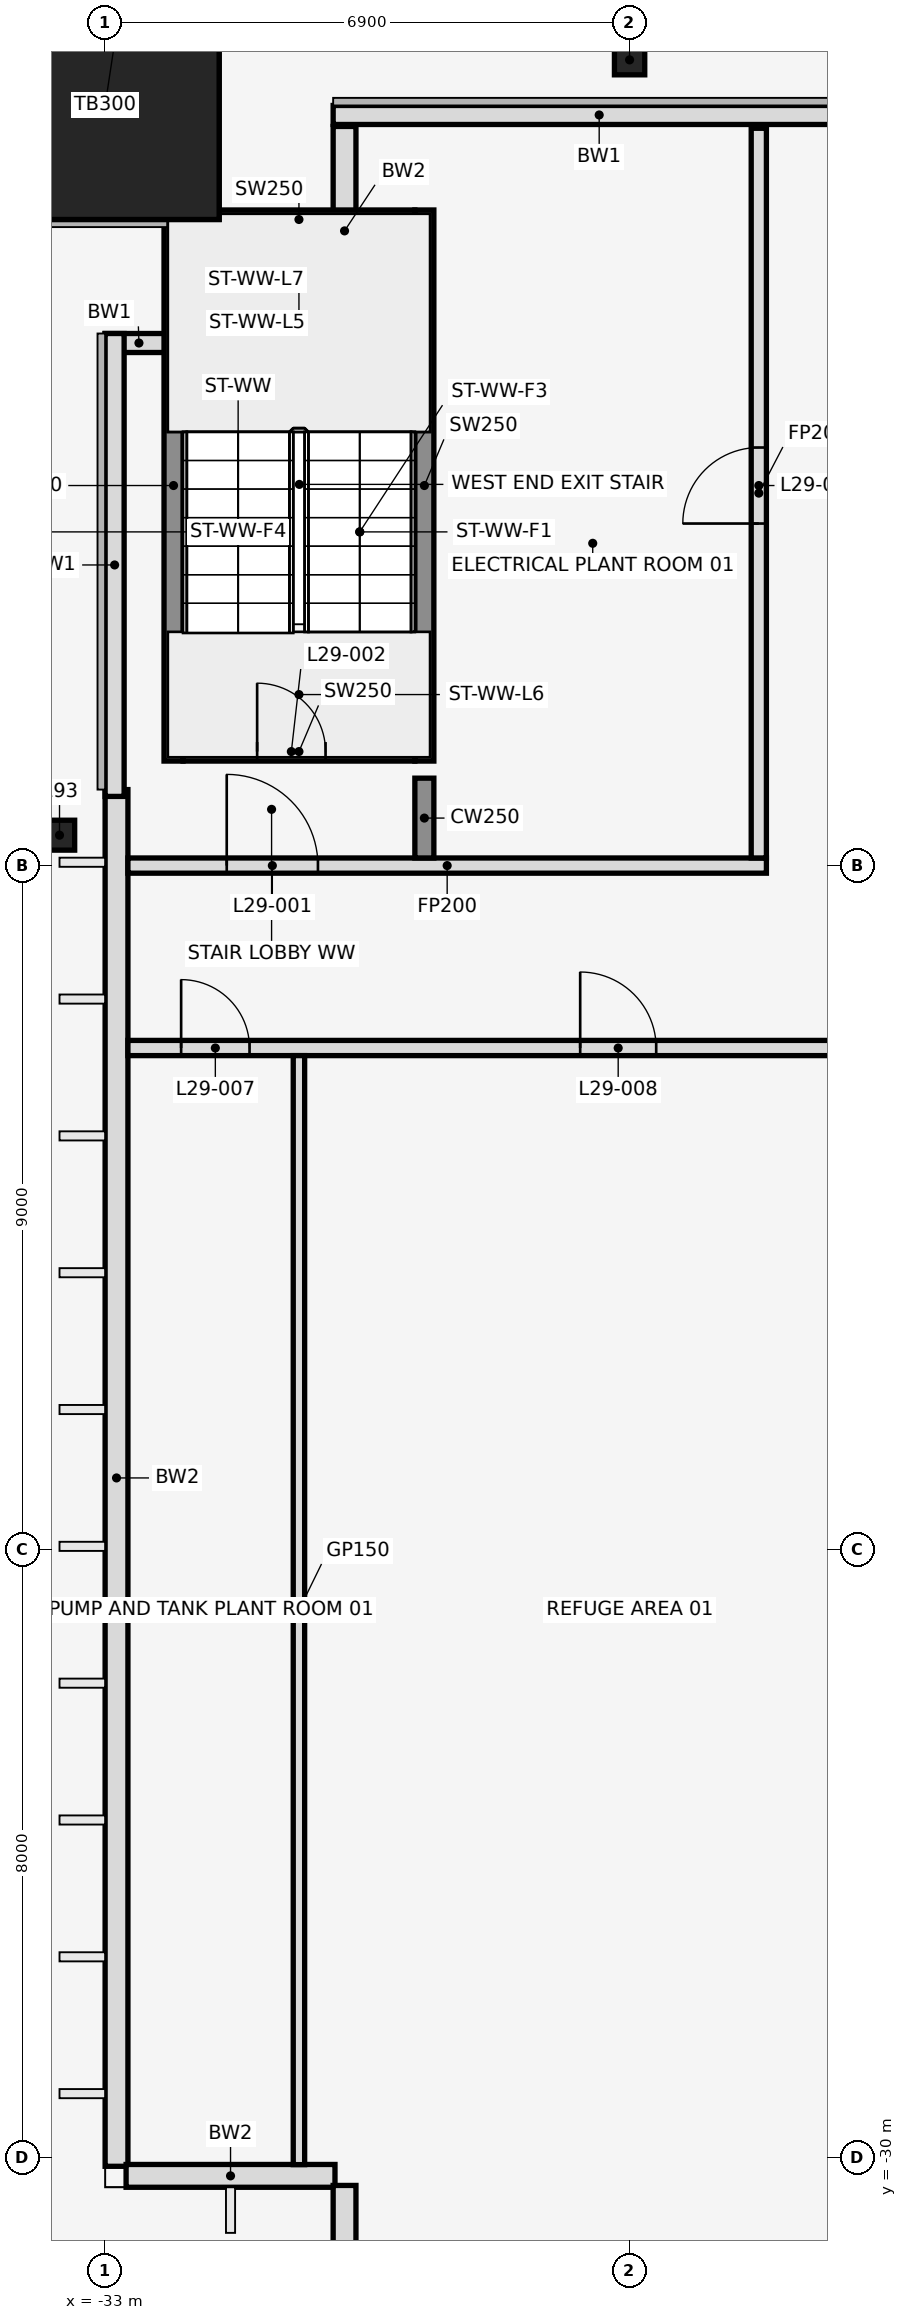
"""IFC4 building model, lengths in metres.
Left out: names, types, materials, properties, quantities, classifications, styles, units other than length and angle.
Written with IfcOpenShell. Run it as: python <this file> out.ifc"""

import sys

from ifc_helpers import new_model, si_unit, direction, frame, frame_2d, origin, origin_2d, place, context, subcontext, project, spatial, rectangle, hollow_rectangle, i_section, extrude, element, fill, save


model = new_model("IFC4")
c1 = context("Model", 3, precision=1e-05, world=origin(), true_north=direction((0.0, 1.0)))
c2 = subcontext(c1, "Body", "Model", "MODEL_VIEW")
j1 = project(units=[si_unit("LENGTHUNIT", "METRE"), si_unit("PLANEANGLEUNIT", "RADIAN")], contexts=[c1])
p1 = place(None, origin())
s1 = spatial("IfcSite", under=j1, at=p1, CompositionType="ELEMENT")
p2 = place(p1, origin())
s2 = spatial("IfcBuilding", under=s1, at=p2, CompositionType="ELEMENT")
p3 = place(p2, frame((0.0, 0.0, 135.0)))
s3 = spatial("IfcBuildingStorey", under=s2, at=p3, CompositionType="ELEMENT", Elevation=135.0)
p4 = place(p3, frame((-33.0, -3.0, 0.0), z_axis=(0.0, 0.0, 1.0), x_axis=(1.0, 0.0, 0.0)))
e1 = element("IfcColumn", 1, at=p4, inside=s3, PredefinedType="COLUMN", context=c2, shape_type="SweptSolid", body=[
    extrude(hollow_rectangle(XDim=3.0, YDim=3.0, WallThickness=0.09, at=origin_2d()), origin(), (0.0, 0.0, 1.0), 4.98),
])
for number, where, z_axis, x_axis in (
    (2, (-26.1, -2.4, 0.0), (0.0, 0.0, 1.0), (1.0, 0.0, 0.0)),
    (3, (-33.6, -12.6, 0.0), (0.0, 0.0, 1.0), (1.0, 0.0, 0.0)),
):
    element("IfcColumn", number, at=place(p3, frame(where, z_axis=z_axis, x_axis=x_axis)), inside=s3, PredefinedType="COLUMN", context=c2, shape_type="SweptSolid", body=[
        extrude(i_section(OverallWidth=0.399, OverallDepth=0.394, WebThickness=0.023, FlangeThickness=0.037, at=origin_2d()), origin(), (0.0, 0.0, 1.0), 5.4),
    ])
p5 = place(p3, frame((-33.0, -3.0, 4.98), z_axis=(0.0, 0.0, 1.0), x_axis=(1.0, 0.0, 0.0)))
e4 = element("IfcColumn", 4, at=p5, inside=s3, PredefinedType="COLUMN", context=c2, shape_type="SweptSolid", body=[
    extrude(rectangle(XDim=3.0, YDim=3.0, at=origin_2d()), origin(), (0.0, 0.0, 1.0), 0.42),
])
p6 = place(p3, frame((-29.85, -3.276, 0.0), z_axis=(0.0, 0.0, 1.0), x_axis=(0.0, -1.0, 0.0)))
e5 = element("IfcWall", 5, at=p6, inside=s3, PredefinedType="STANDARD", context=c2, shape_type="SweptSolid", body=[
    extrude(rectangle(XDim=2.748, YDim=0.3, at=frame_2d((1.374, 0.0))), origin(), (0.0, 0.0, 1.0), 5.25),
])
p7 = place(p3, frame((-32.85, -12.0, 0.0), z_axis=(0.0, 0.0, 1.0), x_axis=(0.0, -1.0, 0.0)))
e6 = element("IfcWall", 6, at=p7, inside=s3, PredefinedType="STANDARD", context=c2, shape_type="SweptSolid", body=[
    extrude(rectangle(XDim=18.112, YDim=0.3, at=frame_2d((9.056, 0.0))), origin(), (0.0, 0.0, 1.0), 4.338),
])
p8 = place(p3, frame((-32.724, -30.238, 0.0), z_axis=(0.0, 0.0, 1.0), x_axis=(1.0, 0.0, 0.0)))
e7 = element("IfcWall", 7, at=p8, inside=s3, PredefinedType="STANDARD", context=c2, shape_type="SweptSolid", body=[
    extrude(rectangle(XDim=2.748, YDim=0.3, at=frame_2d((1.374, 0.0))), origin(), (0.0, 0.0, 1.0), 4.28),
])
p9 = place(p3, frame((-29.85, -30.364, 0.0), z_axis=(0.0, 0.0, 1.0), x_axis=(0.0, -1.0, 0.0)))
e8 = element("IfcWall", 8, at=p9, inside=s3, PredefinedType="STANDARD", context=c2, shape_type="SweptSolid", body=[
    extrude(rectangle(XDim=2.748, YDim=0.3, at=frame_2d((1.374, 0.0))), origin(), (0.0, 0.0, 1.0), 4.28),
])
p10 = place(p3, frame((-23.0, -3.125, 0.0), z_axis=(0.0, 0.0, 1.0), x_axis=(-1.0, 0.0, 0.0)))
e9 = element("IfcWall", 9, at=p10, inside=s3, PredefinedType="STANDARD", context=c2, shape_type="SweptSolid", body=[
    extrude(rectangle(XDim=7.0, YDim=0.25, at=frame_2d((3.5, 0.0))), origin(), (0.0, 0.0, 1.0), 5.25),
])
p11 = place(p3, frame((-32.11, -6.125, 0.0), z_axis=(0.0, 0.0, 1.0), x_axis=(-1.0, 0.0, 0.0)))
e10 = element("IfcWall", 10, at=p11, inside=s3, PredefinedType="STANDARD", context=c2, shape_type="SweptSolid", body=[
    extrude(rectangle(XDim=0.89, YDim=0.25, at=frame_2d((0.445, 0.0))), origin(), (0.0, 0.0, 1.0), 5.25),
])
p12 = place(p3, frame((-32.875, -6.0, 0.0), z_axis=(0.0, 0.0, 1.0), x_axis=(0.0, -1.0, 0.0)))
e11 = element("IfcWall", 11, at=p12, inside=s3, PredefinedType="STANDARD", context=c2, shape_type="SweptSolid", body=[
    extrude(rectangle(XDim=6.09, YDim=0.25, at=frame_2d((3.045, 0.0))), origin(), (0.0, 0.0, 1.0), 5.25),
])
for number, where, z_axis, x_axis in (
    (12, (-32.1, -11.625, 0.0), (0.0, 0.0, 1.0), (0.0, 1.0, 0.0)),
    (13, (-28.8, -11.625, 0.0), (0.0, 0.0, 1.0), (0.0, 1.0, 0.0)),
):
    element("IfcWall", number, at=place(p3, frame(where, z_axis=z_axis, x_axis=x_axis)), inside=s3, PredefinedType="SHEAR", context=c2, shape_type="SweptSolid", body=[
        extrude(rectangle(XDim=7.25, YDim=0.25, at=frame_2d((3.625, 0.0))), origin(), (0.0, 0.0, 1.0), 5.4),
    ])
p13 = place(p3, frame((-31.975, -11.5, 0.0), z_axis=(0.0, 0.0, 1.0), x_axis=(1.0, 0.0, 0.0)))
e14 = element("IfcWall", 14, at=p13, inside=s3, PredefinedType="SHEAR", context=c2, shape_type="SweptSolid", body=[
    extrude(rectangle(XDim=3.05, YDim=0.25, at=frame_2d((1.525, 0.0))), origin(), (0.0, 0.0, 1.0), 5.4),
])
p14 = place(p13, frame((0.975, 0.0, 0.0)))
e15 = element("IfcOpeningElement", 15, at=p14, cuts=e14, PredefinedType="OPENING", context=c2, shape_type="SweptSolid", body=[
    extrude(rectangle(XDim=0.9, YDim=2.1, at=frame_2d((0.45, 1.05))), frame((0.0, 0.137, 0.0), z_axis=(0.0, -1.0, 0.0), x_axis=(1.0, 0.0, 0.0)), (0.0, 0.0, 1.0), 0.274),
])
p15 = place(p3, frame((-31.975, -4.5, 0.0), z_axis=(0.0, 0.0, 1.0), x_axis=(1.0, 0.0, 0.0)))
e16 = element("IfcWall", 16, at=p15, inside=s3, PredefinedType="SHEAR", context=c2, shape_type="SweptSolid", body=[
    extrude(rectangle(XDim=3.05, YDim=0.25, at=frame_2d((1.525, 0.0))), origin(), (0.0, 0.0, 1.0), 5.4),
])
p16 = place(p3, frame((-32.7, -15.4, 0.0), z_axis=(0.0, 0.0, 1.0), x_axis=(1.0, 0.0, 0.0)))
e17 = element("IfcWall", 17, at=p16, inside=s3, PredefinedType="PARTITIONING", context=c2, shape_type="SweptSolid", body=[
    extrude(rectangle(XDim=65.4, YDim=0.2, at=frame_2d((32.7, 0.0))), origin(), (0.0, 0.0, 1.0), 4.24),
])
p17 = place(p16, frame((0.7, 0.0, 0.0)))
e18 = element("IfcOpeningElement", 18, at=p17, cuts=e17, PredefinedType="OPENING", context=c2, shape_type="SweptSolid", body=[
    extrude(rectangle(XDim=0.9, YDim=2.1, at=frame_2d((0.45, 1.05))), frame((0.0, 0.112, 0.0), z_axis=(0.0, -1.0, 0.0), x_axis=(1.0, 0.0, 0.0)), (0.0, 0.0, 1.0), 0.224),
])
p18 = place(p16, frame((5.95, 0.0, 0.0)))
e19 = element("IfcOpeningElement", 19, at=p18, cuts=e17, PredefinedType="OPENING", context=c2, shape_type="SweptSolid", body=[
    extrude(rectangle(XDim=1.0, YDim=2.1, at=frame_2d((0.5, 1.05))), frame((0.0, 0.112, 0.0), z_axis=(0.0, -1.0, 0.0), x_axis=(1.0, 0.0, 0.0)), (0.0, 0.0, 1.0), 0.224),
])
p19 = place(p16, frame((14.85, 0.0, 0.0)))
e20 = element("IfcOpeningElement", 20, at=p19, cuts=e17, PredefinedType="OPENING", context=c2, shape_type="SweptSolid", body=[
    extrude(rectangle(XDim=1.0, YDim=2.1, at=frame_2d((0.5, 1.05))), frame((0.0, 0.112, 0.0), z_axis=(0.0, -1.0, 0.0), x_axis=(1.0, 0.0, 0.0)), (0.0, 0.0, 1.0), 0.224),
])
p20 = place(p16, frame((23.55, 0.0, 0.0)))
e21 = element("IfcOpeningElement", 21, at=p20, cuts=e17, PredefinedType="OPENING", context=c2, shape_type="SweptSolid", body=[
    extrude(rectangle(XDim=1.0, YDim=2.1, at=frame_2d((0.5, 1.05))), frame((0.0, 0.112, 0.0), z_axis=(0.0, -1.0, 0.0), x_axis=(1.0, 0.0, 0.0)), (0.0, 0.0, 1.0), 0.224),
])
p21 = place(p16, frame((34.4, 0.0, 0.0)))
e22 = element("IfcOpeningElement", 22, at=p21, cuts=e17, PredefinedType="OPENING", context=c2, shape_type="SweptSolid", body=[
    extrude(rectangle(XDim=1.0, YDim=2.1, at=frame_2d((0.5, 1.05))), frame((0.0, 0.112, 0.0), z_axis=(0.0, -1.0, 0.0), x_axis=(1.0, 0.0, 0.0)), (0.0, 0.0, 1.0), 0.224),
])
p22 = place(p16, frame((40.95, 0.0, 0.0)))
e23 = element("IfcOpeningElement", 23, at=p22, cuts=e17, PredefinedType="OPENING", context=c2, shape_type="SweptSolid", body=[
    extrude(rectangle(XDim=1.0, YDim=2.1, at=frame_2d((0.5, 1.05))), frame((0.0, 0.112, 0.0), z_axis=(0.0, -1.0, 0.0), x_axis=(1.0, 0.0, 0.0)), (0.0, 0.0, 1.0), 0.224),
])
p23 = place(p16, frame((49.65, 0.0, 0.0)))
e24 = element("IfcOpeningElement", 24, at=p23, cuts=e17, PredefinedType="OPENING", context=c2, shape_type="SweptSolid", body=[
    extrude(rectangle(XDim=0.9, YDim=2.1, at=frame_2d((0.45, 1.05))), frame((0.0, 0.112, 0.0), z_axis=(0.0, -1.0, 0.0), x_axis=(1.0, 0.0, 0.0)), (0.0, 0.0, 1.0), 0.224),
])
p24 = place(p16, frame((58.45, 0.0, 0.0)))
e25 = element("IfcOpeningElement", 25, at=p24, cuts=e17, PredefinedType="OPENING", context=c2, shape_type="SweptSolid", body=[
    extrude(rectangle(XDim=1.0, YDim=2.1, at=frame_2d((0.5, 1.05))), frame((0.0, 0.112, 0.0), z_axis=(0.0, -1.0, 0.0), x_axis=(1.0, 0.0, 0.0)), (0.0, 0.0, 1.0), 0.224),
])
p25 = place(p16, frame((63.85, 0.0, 0.0)))
e26 = element("IfcOpeningElement", 26, at=p25, cuts=e17, PredefinedType="OPENING", context=c2, shape_type="SweptSolid", body=[
    extrude(rectangle(XDim=0.9, YDim=2.1, at=frame_2d((0.45, 1.05))), frame((0.0, 0.112, 0.0), z_axis=(0.0, -1.0, 0.0), x_axis=(1.0, 0.0, 0.0)), (0.0, 0.0, 1.0), 0.224),
])
p26 = place(p3, frame((-32.7, -13.0, 0.0), z_axis=(0.0, 0.0, 1.0), x_axis=(1.0, 0.0, 0.0)))
e27 = element("IfcWall", 27, at=p26, inside=s3, PredefinedType="PARTITIONING", context=c2, shape_type="SweptSolid", body=[
    extrude(rectangle(XDim=8.4, YDim=0.2, at=frame_2d((4.2, 0.0))), origin(), (0.0, 0.0, 1.0), 4.24),
])
p27 = place(p26, frame((1.3, 0.0, 0.0)))
e28 = element("IfcOpeningElement", 28, at=p27, cuts=e27, PredefinedType="OPENING", context=c2, shape_type="SweptSolid", body=[
    extrude(rectangle(XDim=1.2, YDim=2.1, at=frame_2d((0.6, 1.05))), frame((0.0, 0.112, 0.0), z_axis=(0.0, -1.0, 0.0), x_axis=(1.0, 0.0, 0.0)), (0.0, 0.0, 1.0), 0.224),
])
p28 = place(p3, frame((-30.45, -30.09, 0.0), z_axis=(0.0, 0.0, 1.0), x_axis=(0.0, 1.0, 0.0)))
e29 = element("IfcWall", 29, at=p28, inside=s3, PredefinedType="PARTITIONING", context=c2, shape_type="SweptSolid", body=[
    extrude(rectangle(XDim=14.59, YDim=0.15, at=frame_2d((7.295, 0.0))), origin(), (0.0, 0.0, 1.0), 4.24),
])
p29 = place(p3, frame((-28.8, -12.9, 0.0), z_axis=(0.0, 0.0, 1.0), x_axis=(0.0, 1.0, 0.0)))
e30 = element("IfcWall", 30, at=p29, inside=s3, PredefinedType="SHEAR", context=c2, shape_type="SweptSolid", body=[
    extrude(rectangle(XDim=1.05, YDim=0.25, at=frame_2d((0.525, 0.0))), origin(), (0.0, 0.0, 1.0), 5.4),
])
p30 = place(p3, frame((-24.4, -12.9, 0.0), z_axis=(0.0, 0.0, 1.0), x_axis=(0.0, 1.0, 0.0)))
e31 = element("IfcWall", 31, at=p30, inside=s3, PredefinedType="PARTITIONING", context=c2, shape_type="SweptSolid", body=[
    extrude(rectangle(XDim=9.6, YDim=0.2, at=frame_2d((4.8, 0.0))), origin(), (0.0, 0.0, 1.0), 4.24),
])
p31 = place(p30, frame((4.4, 0.0, 0.0)))
e32 = element("IfcOpeningElement", 32, at=p31, cuts=e31, PredefinedType="OPENING", context=c2, shape_type="SweptSolid", body=[
    extrude(rectangle(XDim=1.0, YDim=2.1, at=frame_2d((0.5, 1.05))), frame((0.0, 0.112, 0.0), z_axis=(0.0, -1.0, 0.0), x_axis=(1.0, 0.0, 0.0)), (0.0, 0.0, 1.0), 0.224),
])
p32 = place(p27, origin())
e33 = element("IfcDoor", 33, at=p32, inside=s3, OperationType="SINGLE_SWING_LEFT", PredefinedType="DOOR", context=c2, shape_type="SweptSolid", body=[
    extrude(rectangle(XDim=1.2, YDim=2.1, at=frame_2d((0.6, 1.05))), frame((0.0, 0.025, 0.0), z_axis=(0.0, -1.0, 0.0), x_axis=(1.0, 0.0, 0.0)), (0.0, 0.0, 1.0), 0.05),
])
fill(e28, e33)
p33 = place(p14, origin())
e34 = element("IfcDoor", 34, at=p33, inside=s3, OperationType="SINGLE_SWING_LEFT", PredefinedType="DOOR", context=c2, shape_type="SweptSolid", body=[
    extrude(rectangle(XDim=0.9, YDim=2.1, at=frame_2d((0.45, 1.05))), frame((0.0, 0.025, 0.0), z_axis=(0.0, -1.0, 0.0), x_axis=(1.0, 0.0, 0.0)), (0.0, 0.0, 1.0), 0.05),
])
fill(e15, e34)
p34 = place(p31, origin())
e35 = element("IfcDoor", 35, at=p34, inside=s3, OperationType="SINGLE_SWING_LEFT", PredefinedType="DOOR", context=c2, shape_type="SweptSolid", body=[
    extrude(rectangle(XDim=1.0, YDim=2.1, at=frame_2d((0.5, 1.05))), frame((0.0, 0.025, 0.0), z_axis=(0.0, -1.0, 0.0), x_axis=(1.0, 0.0, 0.0)), (0.0, 0.0, 1.0), 0.05),
])
fill(e32, e35)
p35 = place(p17, frame((0.9, 0.0, 0.0), z_axis=(0.0, 0.0, 1.0), x_axis=(-1.0, 0.0, 0.0)))
e36 = element("IfcDoor", 36, at=p35, inside=s3, OperationType="SINGLE_SWING_LEFT", PredefinedType="DOOR", context=c2, shape_type="SweptSolid", body=[
    extrude(rectangle(XDim=0.9, YDim=2.1, at=frame_2d((0.45, 1.05))), frame((0.0, 0.025, 0.0), z_axis=(0.0, -1.0, 0.0), x_axis=(1.0, 0.0, 0.0)), (0.0, 0.0, 1.0), 0.05),
])
fill(e18, e36)
p36 = place(p18, frame((1.0, 0.0, 0.0), z_axis=(0.0, 0.0, 1.0), x_axis=(-1.0, 0.0, 0.0)))
e37 = element("IfcDoor", 37, at=p36, inside=s3, OperationType="SINGLE_SWING_RIGHT", PredefinedType="DOOR", context=c2, shape_type="SweptSolid", body=[
    extrude(rectangle(XDim=1.0, YDim=2.1, at=frame_2d((0.5, 1.05))), frame((0.0, 0.025, 0.0), z_axis=(0.0, -1.0, 0.0), x_axis=(1.0, 0.0, 0.0)), (0.0, 0.0, 1.0), 0.05),
])
fill(e19, e37)
save(model, sys.argv[1])
